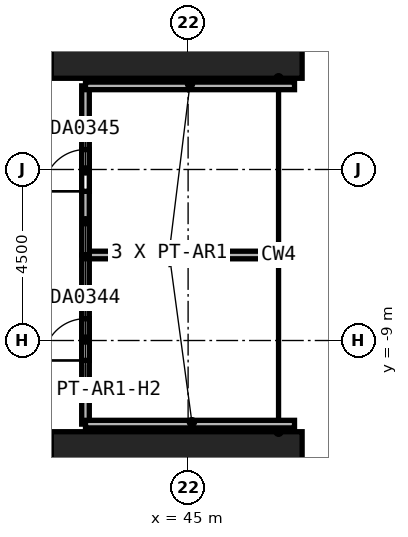
"""IFC4 building model, lengths in metres.
Left out: names, types, materials, properties, quantities, classifications, styles, units other than length and angle.
Written with IfcOpenShell. Run it as: python <this file> out.ifc"""

import sys

from ifc_helpers import new_model, si_unit, direction, frame, frame_2d, origin, origin_2d, place, context, subcontext, project, spatial, rectangle, extrude, element, fill, save


model = new_model("IFC4")
c1 = context("Model", 3, precision=1e-05, world=origin(), true_north=direction((0.0, 1.0)))
c2 = subcontext(c1, "Body", "Model", "MODEL_VIEW")
j1 = project(units=[si_unit("LENGTHUNIT", "METRE"), si_unit("PLANEANGLEUNIT", "RADIAN")], contexts=[c1])
p1 = place(None, origin())
s1 = spatial("IfcSite", under=j1, at=p1, CompositionType="ELEMENT")
p2 = place(p1, origin())
s2 = spatial("IfcBuilding", under=s1, at=p2, CompositionType="ELEMENT")
p3 = place(p2, frame((0.0, 0.0, 12.0)))
s3 = spatial("IfcBuildingStorey", under=s2, at=p3, CompositionType="ELEMENT", Elevation=12.0)
for number, where, z_axis, x_axis in (
    (1, (44.7, -13.5, 0.0), (0.0, 0.0, 1.0), (0.0, 1.0, 0.0)),
    (2, (44.7, 0.0, 0.0), (0.0, 0.0, 1.0), (0.0, 1.0, 0.0)),
):
    element("IfcColumn", number, at=place(p3, frame(where, z_axis=z_axis, x_axis=x_axis)), inside=s3, PredefinedType="COLUMN", context=c2, shape_type="SweptSolid", body=[
        extrude(rectangle(XDim=4.2, YDim=6.6, at=origin_2d()), origin(), (0.0, 0.0, 1.0), 7.0),
    ])
p4 = place(p3, frame((42.3, -11.2, 0.0), z_axis=(0.0, 0.0, 1.0), x_axis=(0.0, 1.0, 0.0)))
e3 = element("IfcWall", 3, at=p4, inside=s3, PredefinedType="PARTITIONING", context=c2, shape_type="SweptSolid", body=[
    extrude(rectangle(XDim=4.45, YDim=0.2, at=frame_2d((2.225, 0.0))), origin(), (0.0, 0.0, 1.0), 5.5),
])
p5 = place(p4, frame((1.675, 0.0, 0.0)))
e4 = element("IfcOpeningElement", 4, at=p5, cuts=e3, PredefinedType="OPENING", context=c2, shape_type="SweptSolid", body=[
    extrude(rectangle(XDim=1.1, YDim=2.4, at=frame_2d((0.55, 1.2))), frame((0.0, 0.1, 0.0), z_axis=(0.0, -1.0, 0.0), x_axis=(1.0, 0.0, 0.0)), (0.0, 0.0, 1.0), 0.2),
])
for number, where, z_axis, x_axis in (
    (5, (42.3, -11.2, 0.0), (0.0, 0.0, 1.0), (1.0, 0.0, 0.0)),
    (6, (42.3, -6.75, 0.0), (0.0, 0.0, 1.0), (1.0, 0.0, 0.0)),
):
    element("IfcWall", number, at=place(p3, frame(where, z_axis=z_axis, x_axis=x_axis)), inside=s3, PredefinedType="PARTITIONING", context=c2, shape_type="SweptSolid", body=[
        extrude(rectangle(XDim=5.5, YDim=0.2, at=frame_2d((2.75, 0.0))), origin(), (0.0, 0.0, 1.0), 6.7),
    ])
p6 = place(p3, frame((42.3, -6.75, 0.0), z_axis=(0.0, 0.0, 1.0), x_axis=(0.0, 1.0, 0.0)))
e7 = element("IfcWall", 7, at=p6, inside=s3, PredefinedType="PARTITIONING", context=c2, shape_type="SweptSolid", body=[
    extrude(rectangle(XDim=4.45, YDim=0.2, at=frame_2d((2.225, 0.0))), origin(), (0.0, 0.0, 1.0), 5.5),
])
p7 = place(p6, frame((1.675, 0.0, 0.0)))
e8 = element("IfcOpeningElement", 8, at=p7, cuts=e7, PredefinedType="OPENING", context=c2, shape_type="SweptSolid", body=[
    extrude(rectangle(XDim=1.1, YDim=2.4, at=frame_2d((0.55, 1.2))), frame((0.0, 0.1, 0.0), z_axis=(0.0, -1.0, 0.0), x_axis=(1.0, 0.0, 0.0)), (0.0, 0.0, 1.0), 0.2),
])
p8 = place(p3, frame((42.3, -2.3, 0.0), z_axis=(0.0, 0.0, 1.0), x_axis=(1.0, 0.0, 0.0)))
e9 = element("IfcWall", 9, at=p8, inside=s3, PredefinedType="PARTITIONING", context=c2, shape_type="SweptSolid", body=[
    extrude(rectangle(XDim=5.5, YDim=0.2, at=frame_2d((2.75, 0.0))), origin(), (0.0, 0.0, 1.0), 6.7),
])
p9 = place(p5, origin())
e10 = element("IfcDoor", 10, at=p9, inside=s3, OperationType="DOUBLE_DOOR_SINGLE_SWING", PredefinedType="DOOR", context=c2, shape_type="SweptSolid", body=[
    extrude(rectangle(XDim=1.1, YDim=2.4, at=frame_2d((0.55, 1.2))), frame((0.0, 0.025, 0.0), z_axis=(0.0, -1.0, 0.0), x_axis=(1.0, 0.0, 0.0)), (0.0, 0.0, 1.0), 0.05),
])
fill(e4, e10)
p10 = place(p7, origin())
e11 = element("IfcDoor", 11, at=p10, inside=s3, OperationType="DOUBLE_DOOR_SINGLE_SWING", PredefinedType="DOOR", context=c2, shape_type="SweptSolid", body=[
    extrude(rectangle(XDim=1.1, YDim=2.4, at=frame_2d((0.55, 1.2))), frame((0.0, 0.025, 0.0), z_axis=(0.0, -1.0, 0.0), x_axis=(1.0, 0.0, 0.0)), (0.0, 0.0, 1.0), 0.05),
])
fill(e8, e11)
save(model, sys.argv[1])
